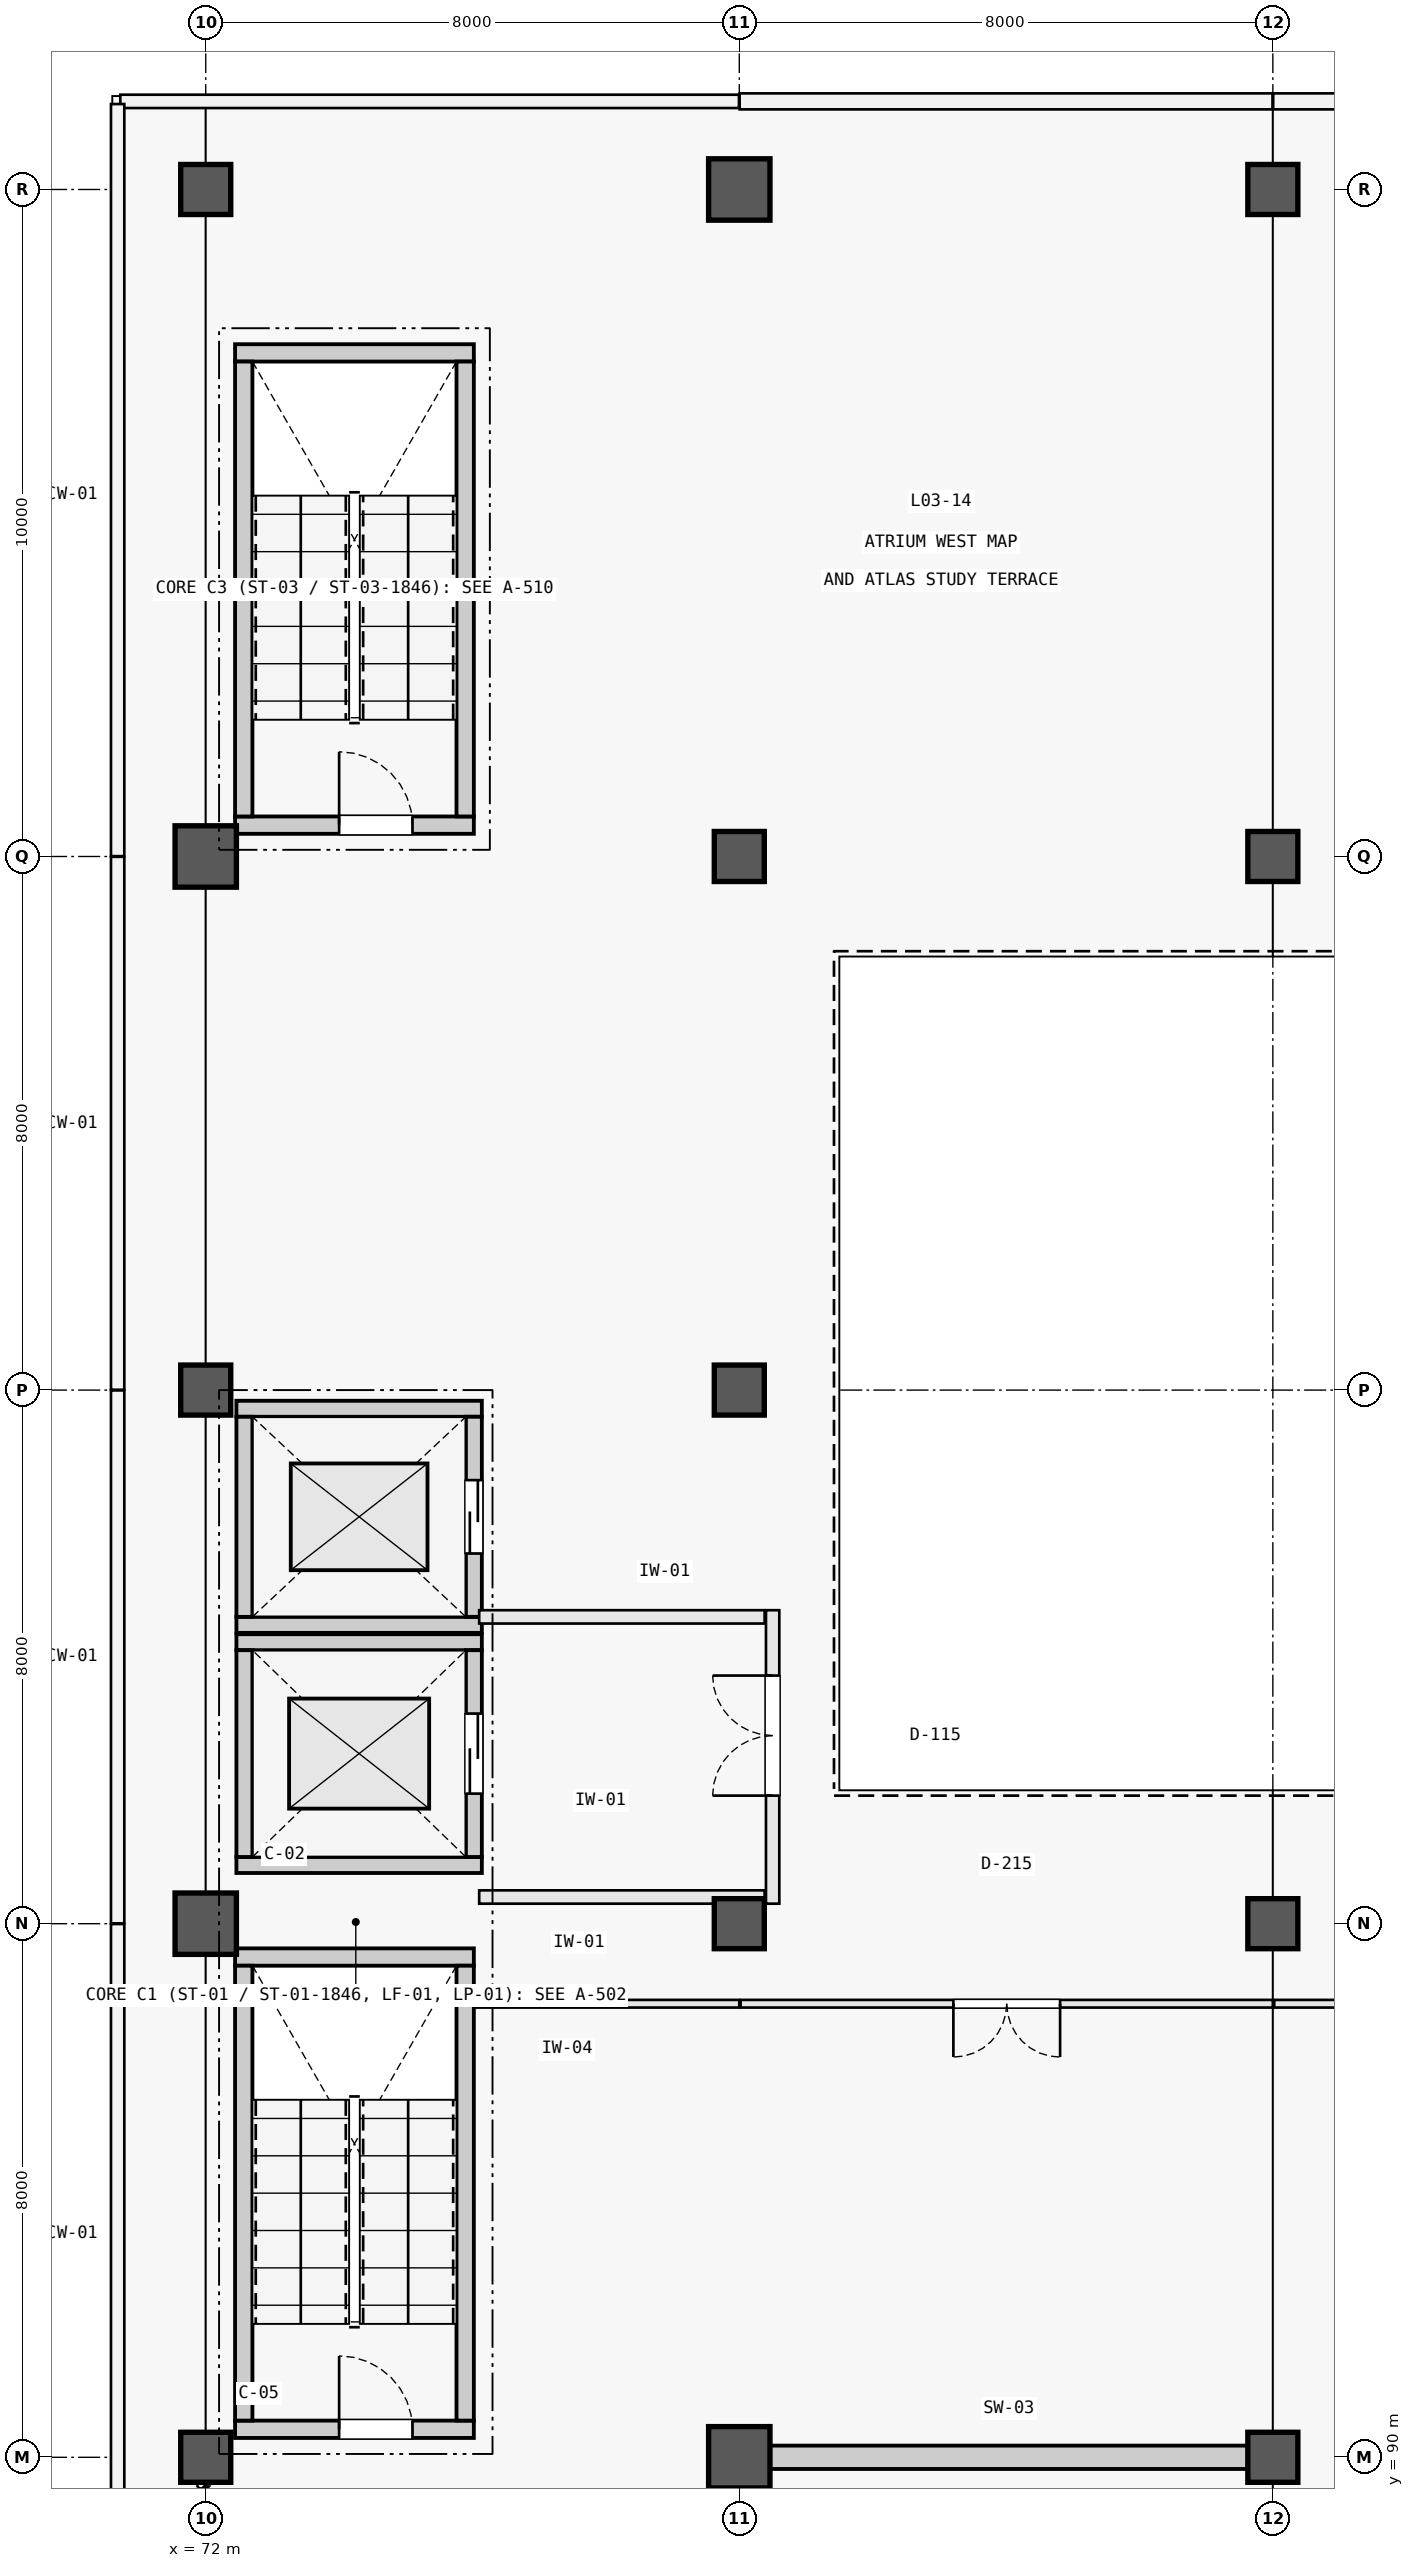
"""IFC4 building model, lengths in metres.
Left out: names, types, materials, properties, quantities, classifications, styles, units other than length and angle.
Written with IfcOpenShell. Run it as: python <this file> out.ifc"""

import sys

from ifc_helpers import new_model, si_unit, direction, frame, frame_2d, origin, origin_2d, place, context, subcontext, project, spatial, rectangle, extrude, element, fill, save


model = new_model("IFC4")
c1 = context("Model", 3, precision=1e-05, world=origin(), true_north=direction((0.0, 1.0)))
c2 = subcontext(c1, "Body", "Model", "MODEL_VIEW")
j1 = project(units=[si_unit("LENGTHUNIT", "METRE"), si_unit("PLANEANGLEUNIT", "RADIAN")], contexts=[c1])
p1 = place(None, origin())
s1 = spatial("IfcSite", under=j1, at=p1, CompositionType="ELEMENT")
p2 = place(p1, origin())
s2 = spatial("IfcBuilding", under=s1, at=p2, CompositionType="ELEMENT")
p3 = place(p2, frame((0.0, 0.0, 10.5)))
s3 = spatial("IfcBuildingStorey", under=s2, at=p3, CompositionType="ELEMENT", Elevation=10.5)
p4 = place(p3, frame((72.0, 90.0, 0.0), z_axis=(0.0, 0.0, 1.0), x_axis=(1.0, 0.0, 0.0)))
e1 = element("IfcColumn", 1, at=p4, inside=s3, PredefinedType="COLUMN", context=c2, shape_type="SweptSolid", body=[
    extrude(rectangle(XDim=0.75, YDim=0.75, at=origin_2d()), origin(), (0.0, 0.0, 1.0), 4.8),
])
p5 = place(p3, frame((72.0, 98.0, 0.0), z_axis=(0.0, 0.0, 1.0), x_axis=(1.0, 0.0, 0.0)))
e2 = element("IfcColumn", 2, at=p5, inside=s3, PredefinedType="COLUMN", context=c2, shape_type="SweptSolid", body=[
    extrude(rectangle(XDim=0.92, YDim=0.92, at=origin_2d()), origin(), (0.0, 0.0, 1.0), 4.8),
])
p6 = place(p3, frame((72.0, 106.0, 0.0), z_axis=(0.0, 0.0, 1.0), x_axis=(1.0, 0.0, 0.0)))
e3 = element("IfcColumn", 3, at=p6, inside=s3, PredefinedType="COLUMN", context=c2, shape_type="SweptSolid", body=[
    extrude(rectangle(XDim=0.75, YDim=0.75, at=origin_2d()), origin(), (0.0, 0.0, 1.0), 4.8),
])
p7 = place(p3, frame((72.0, 114.0, 0.0), z_axis=(0.0, 0.0, 1.0), x_axis=(1.0, 0.0, 0.0)))
e4 = element("IfcColumn", 4, at=p7, inside=s3, PredefinedType="COLUMN", context=c2, shape_type="SweptSolid", body=[
    extrude(rectangle(XDim=0.92, YDim=0.92, at=origin_2d()), origin(), (0.0, 0.0, 1.0), 4.8),
])
p8 = place(p3, frame((72.0, 124.0, 0.0), z_axis=(0.0, 0.0, 1.0), x_axis=(1.0, 0.0, 0.0)))
e5 = element("IfcColumn", 5, at=p8, inside=s3, PredefinedType="COLUMN", context=c2, shape_type="SweptSolid", body=[
    extrude(rectangle(XDim=0.75, YDim=0.75, at=origin_2d()), origin(), (0.0, 0.0, 1.0), 4.8),
])
p9 = place(p3, frame((80.0, 90.0, 0.0), z_axis=(0.0, 0.0, 1.0), x_axis=(1.0, 0.0, 0.0)))
e6 = element("IfcColumn", 6, at=p9, inside=s3, PredefinedType="COLUMN", context=c2, shape_type="SweptSolid", body=[
    extrude(rectangle(XDim=0.92, YDim=0.92, at=origin_2d()), origin(), (0.0, 0.0, 1.0), 4.8),
])
for number, where, z_axis, x_axis in (
    (7, (80.0, 98.0, 0.0), (0.0, 0.0, 1.0), (1.0, 0.0, 0.0)),
    (8, (80.0, 106.0, 0.0), (0.0, 0.0, 1.0), (1.0, 0.0, 0.0)),
    (9, (80.0, 114.0, 0.0), (0.0, 0.0, 1.0), (1.0, 0.0, 0.0)),
):
    element("IfcColumn", number, at=place(p3, frame(where, z_axis=z_axis, x_axis=x_axis)), inside=s3, PredefinedType="COLUMN", context=c2, shape_type="SweptSolid", body=[
        extrude(rectangle(XDim=0.75, YDim=0.75, at=origin_2d()), origin(), (0.0, 0.0, 1.0), 4.8),
    ])
p10 = place(p3, frame((80.0, 124.0, 0.0), z_axis=(0.0, 0.0, 1.0), x_axis=(1.0, 0.0, 0.0)))
e10 = element("IfcColumn", 10, at=p10, inside=s3, PredefinedType="COLUMN", context=c2, shape_type="SweptSolid", body=[
    extrude(rectangle(XDim=0.92, YDim=0.92, at=origin_2d()), origin(), (0.0, 0.0, 1.0), 4.8),
])
for number, where, z_axis, x_axis in (
    (11, (88.0, 90.0, 0.0), (0.0, 0.0, 1.0), (1.0, 0.0, 0.0)),
    (12, (88.0, 98.0, 0.0), (0.0, 0.0, 1.0), (1.0, 0.0, 0.0)),
    (13, (88.0, 114.0, 0.0), (0.0, 0.0, 1.0), (1.0, 0.0, 0.0)),
    (14, (88.0, 124.0, 0.0), (0.0, 0.0, 1.0), (1.0, 0.0, 0.0)),
):
    element("IfcColumn", number, at=place(p3, frame(where, z_axis=z_axis, x_axis=x_axis)), inside=s3, PredefinedType="COLUMN", context=c2, shape_type="SweptSolid", body=[
        extrude(rectangle(XDim=0.75, YDim=0.75, at=origin_2d()), origin(), (0.0, 0.0, 1.0), 4.8),
    ])
p11 = place(p3, frame((80.46, 90.0, 0.0), z_axis=(0.0, 0.0, 1.0), x_axis=(1.0, 0.0, 0.0)))
e15 = element("IfcWall", 15, at=p11, inside=s3, PredefinedType="SHEAR", context=c2, shape_type="SweptSolid", body=[
    extrude(rectangle(XDim=7.165, YDim=0.35, at=frame_2d((3.583, 0.0))), origin(), (0.0, 0.0, 1.0), 4.48),
])
p12 = place(p3, frame((72.44, 90.42, 0.0), z_axis=(0.0, 0.0, 1.0), x_axis=(1.0, 0.0, 0.0)))
e16 = element("IfcWall", 16, at=p12, inside=s3, PredefinedType="SOLIDWALL", context=c2, shape_type="SweptSolid", body=[
    extrude(rectangle(XDim=3.58, YDim=0.26, at=frame_2d((1.79, 0.0))), origin(), (0.0, 0.0, 1.0), 4.8),
])
p13 = place(p12, frame((1.56, 0.0, 0.0)))
e17 = element("IfcOpeningElement", 17, at=p13, cuts=e16, PredefinedType="OPENING", context=c2, shape_type="SweptSolid", body=[
    extrude(rectangle(XDim=1.1, YDim=2.2, at=frame_2d((0.55, 1.1))), frame((0.0, 0.142, 0.0), z_axis=(0.0, -1.0, 0.0), x_axis=(1.0, 0.0, 0.0)), (0.0, 0.0, 1.0), 0.284),
])
p14 = place(p3, frame((72.44, 97.5, 0.0), z_axis=(0.0, 0.0, 1.0), x_axis=(1.0, 0.0, 0.0)))
e18 = element("IfcWall", 18, at=p14, inside=s3, PredefinedType="SOLIDWALL", context=c2, shape_type="SweptSolid", body=[
    extrude(rectangle(XDim=3.58, YDim=0.26, at=frame_2d((1.79, 0.0))), origin(), (0.0, 0.0, 1.0), 4.8),
])
for number, where, z_axis, x_axis in (
    (19, (72.57, 90.55, 0.0), (0.0, 0.0, 1.0), (0.0, 1.0, 0.0)),
    (20, (75.89, 90.55, 0.0), (0.0, 0.0, 1.0), (0.0, 1.0, 0.0)),
):
    element("IfcWall", number, at=place(p3, frame(where, z_axis=z_axis, x_axis=x_axis)), inside=s3, PredefinedType="SOLIDWALL", context=c2, shape_type="SweptSolid", body=[
        extrude(rectangle(XDim=6.82, YDim=0.26, at=frame_2d((3.41, 0.0))), origin(), (0.0, 0.0, 1.0), 4.8),
    ])
p15 = place(p3, frame((72.44, 114.47, 0.0), z_axis=(0.0, 0.0, 1.0), x_axis=(1.0, 0.0, 0.0)))
e21 = element("IfcWall", 21, at=p15, inside=s3, PredefinedType="SOLIDWALL", context=c2, shape_type="SweptSolid", body=[
    extrude(rectangle(XDim=3.58, YDim=0.26, at=frame_2d((1.79, 0.0))), origin(), (0.0, 0.0, 1.0), 4.8),
])
p16 = place(p15, frame((1.56, 0.0, 0.0)))
e22 = element("IfcOpeningElement", 22, at=p16, cuts=e21, PredefinedType="OPENING", context=c2, shape_type="SweptSolid", body=[
    extrude(rectangle(XDim=1.1, YDim=2.2, at=frame_2d((0.55, 1.1))), frame((0.0, 0.142, 0.0), z_axis=(0.0, -1.0, 0.0), x_axis=(1.0, 0.0, 0.0)), (0.0, 0.0, 1.0), 0.284),
])
p17 = place(p3, frame((72.44, 121.55, 0.0), z_axis=(0.0, 0.0, 1.0), x_axis=(1.0, 0.0, 0.0)))
e23 = element("IfcWall", 23, at=p17, inside=s3, PredefinedType="SOLIDWALL", context=c2, shape_type="SweptSolid", body=[
    extrude(rectangle(XDim=3.58, YDim=0.26, at=frame_2d((1.79, 0.0))), origin(), (0.0, 0.0, 1.0), 4.8),
])
for number, where, z_axis, x_axis in (
    (24, (72.57, 114.6, 0.0), (0.0, 0.0, 1.0), (0.0, 1.0, 0.0)),
    (25, (75.89, 114.6, 0.0), (0.0, 0.0, 1.0), (0.0, 1.0, 0.0)),
):
    element("IfcWall", number, at=place(p3, frame(where, z_axis=z_axis, x_axis=x_axis)), inside=s3, PredefinedType="SOLIDWALL", context=c2, shape_type="SweptSolid", body=[
        extrude(rectangle(XDim=6.82, YDim=0.26, at=frame_2d((3.41, 0.0))), origin(), (0.0, 0.0, 1.0), 4.8),
    ])
for number, where, z_axis, x_axis in (
    (26, (72.46, 98.88, 0.0), (0.0, 0.0, 1.0), (1.0, 0.0, 0.0)),
    (27, (72.46, 102.22, 0.0), (0.0, 0.0, 1.0), (1.0, 0.0, 0.0)),
):
    element("IfcWall", number, at=place(p3, frame(where, z_axis=z_axis, x_axis=x_axis)), inside=s3, PredefinedType="SOLIDWALL", context=c2, shape_type="SweptSolid", body=[
        extrude(rectangle(XDim=3.68, YDim=0.24, at=frame_2d((1.84, 0.0))), origin(), (0.0, 0.0, 1.0), 4.8),
    ])
p18 = place(p3, frame((72.58, 99.0, 0.0), z_axis=(0.0, 0.0, 1.0), x_axis=(0.0, 1.0, 0.0)))
e28 = element("IfcWall", 28, at=p18, inside=s3, PredefinedType="SOLIDWALL", context=c2, shape_type="SweptSolid", body=[
    extrude(rectangle(XDim=3.1, YDim=0.24, at=frame_2d((1.55, 0.0))), origin(), (0.0, 0.0, 1.0), 4.8),
])
p19 = place(p3, frame((76.02, 99.0, 0.0), z_axis=(0.0, 0.0, 1.0), x_axis=(0.0, 1.0, 0.0)))
e29 = element("IfcWall", 29, at=p19, inside=s3, PredefinedType="SOLIDWALL", context=c2, shape_type="SweptSolid", body=[
    extrude(rectangle(XDim=3.1, YDim=0.24, at=frame_2d((1.55, 0.0))), origin(), (0.0, 0.0, 1.0), 4.8),
])
p20 = place(p19, frame((0.95, 0.0, 0.0)))
e30 = element("IfcOpeningElement", 30, at=p20, cuts=e29, PredefinedType="OPENING", context=c2, shape_type="SweptSolid", body=[
    extrude(rectangle(XDim=1.2, YDim=2.2, at=frame_2d((0.6, 1.1))), frame((0.0, 0.132, 0.0), z_axis=(0.0, -1.0, 0.0), x_axis=(1.0, 0.0, 0.0)), (0.0, 0.0, 1.0), 0.264),
])
for number, where, z_axis, x_axis in (
    (31, (72.46, 102.48, 0.0), (0.0, 0.0, 1.0), (1.0, 0.0, 0.0)),
    (32, (72.46, 105.72, 0.0), (0.0, 0.0, 1.0), (1.0, 0.0, 0.0)),
):
    element("IfcWall", number, at=place(p3, frame(where, z_axis=z_axis, x_axis=x_axis)), inside=s3, PredefinedType="SOLIDWALL", context=c2, shape_type="SweptSolid", body=[
        extrude(rectangle(XDim=3.68, YDim=0.24, at=frame_2d((1.84, 0.0))), origin(), (0.0, 0.0, 1.0), 4.8),
    ])
p21 = place(p3, frame((72.58, 102.6, 0.0), z_axis=(0.0, 0.0, 1.0), x_axis=(0.0, 1.0, 0.0)))
e33 = element("IfcWall", 33, at=p21, inside=s3, PredefinedType="SOLIDWALL", context=c2, shape_type="SweptSolid", body=[
    extrude(rectangle(XDim=3.0, YDim=0.24, at=frame_2d((1.5, 0.0))), origin(), (0.0, 0.0, 1.0), 4.8),
])
p22 = place(p3, frame((76.02, 102.6, 0.0), z_axis=(0.0, 0.0, 1.0), x_axis=(0.0, 1.0, 0.0)))
e34 = element("IfcWall", 34, at=p22, inside=s3, PredefinedType="SOLIDWALL", context=c2, shape_type="SweptSolid", body=[
    extrude(rectangle(XDim=3.0, YDim=0.24, at=frame_2d((1.5, 0.0))), origin(), (0.0, 0.0, 1.0), 4.8),
])
p23 = place(p22, frame((0.95, 0.0, 0.0)))
e35 = element("IfcOpeningElement", 35, at=p23, cuts=e34, PredefinedType="OPENING", context=c2, shape_type="SweptSolid", body=[
    extrude(rectangle(XDim=1.1, YDim=2.2, at=frame_2d((0.55, 1.1))), frame((0.0, 0.132, 0.0), z_axis=(0.0, -1.0, 0.0), x_axis=(1.0, 0.0, 0.0)), (0.0, 0.0, 1.0), 0.264),
])
for number, where, z_axis, x_axis in (
    (36, (76.1, 98.4, 0.0), (0.0, 0.0, 1.0), (1.0, 0.0, 0.0)),
    (37, (76.1, 102.6, 0.0), (0.0, 0.0, 1.0), (1.0, 0.0, 0.0)),
):
    element("IfcWall", number, at=place(p3, frame(where, z_axis=z_axis, x_axis=x_axis)), inside=s3, PredefinedType="PARTITIONING", context=c2, shape_type="SweptSolid", body=[
        extrude(rectangle(XDim=4.28, YDim=0.2, at=frame_2d((2.14, 0.0))), origin(), (0.0, 0.0, 1.0), 3.5),
    ])
p24 = place(p3, frame((80.5, 98.3, 0.0), z_axis=(0.0, 0.0, 1.0), x_axis=(0.0, 1.0, 0.0)))
e38 = element("IfcWall", 38, at=p24, inside=s3, PredefinedType="PARTITIONING", context=c2, shape_type="SweptSolid", body=[
    extrude(rectangle(XDim=4.4, YDim=0.2, at=frame_2d((2.2, 0.0))), origin(), (0.0, 0.0, 1.0), 3.5),
])
p25 = place(p24, frame((1.62, 0.0, 0.0)))
e39 = element("IfcOpeningElement", 39, at=p25, cuts=e38, PredefinedType="OPENING", context=c2, shape_type="SweptSolid", body=[
    extrude(rectangle(XDim=1.8, YDim=2.25, at=frame_2d((0.9, 1.125))), frame((0.0, 0.112, 0.0), z_axis=(0.0, -1.0, 0.0), x_axis=(1.0, 0.0, 0.0)), (0.0, 0.0, 1.0), 0.224),
])
p26 = place(p3, frame((76.03, 96.8, 0.0), z_axis=(0.0, 0.0, 1.0), x_axis=(1.0, 0.0, 0.0)))
e40 = element("IfcWall", 40, at=p26, inside=s3, PredefinedType="PARTITIONING", context=c2, shape_type="SweptSolid", body=[
    extrude(rectangle(XDim=3.97, YDim=0.115, at=frame_2d((1.985, 0.0))), origin(), (0.0, 0.0, 1.0), 3.33),
])
p27 = place(p3, frame((80.02, 96.8, 0.0), z_axis=(0.0, 0.0, 1.0), x_axis=(1.0, 0.0, 0.0)))
e41 = element("IfcWall", 41, at=p27, inside=s3, PredefinedType="PARTITIONING", context=c2, shape_type="SweptSolid", body=[
    extrude(rectangle(XDim=7.98, YDim=0.115, at=frame_2d((3.99, 0.0))), origin(), (0.0, 0.0, 1.0), 3.33),
])
p28 = place(p27, frame((3.19, 0.0, 0.0)))
e42 = element("IfcOpeningElement", 42, at=p28, cuts=e41, PredefinedType="OPENING", context=c2, shape_type="SweptSolid", body=[
    extrude(rectangle(XDim=1.6, YDim=2.2, at=frame_2d((0.8, 1.1))), frame((0.0, 0.069, 0.0), z_axis=(0.0, -1.0, 0.0), x_axis=(1.0, 0.0, 0.0)), (0.0, 0.0, 1.0), 0.139),
])
p29 = place(p3, frame((88.02, 96.8, 0.0), z_axis=(0.0, 0.0, 1.0), x_axis=(1.0, 0.0, 0.0)))
e43 = element("IfcWall", 43, at=p29, inside=s3, PredefinedType="PARTITIONING", context=c2, shape_type="SweptSolid", body=[
    extrude(rectangle(XDim=7.98, YDim=0.115, at=frame_2d((3.99, 0.0))), origin(), (0.0, 0.0, 1.0), 3.33),
])
p30 = place(p29, frame((3.515, 0.0, 0.0)))
e44 = element("IfcOpeningElement", 44, at=p30, cuts=e43, PredefinedType="OPENING", context=c2, shape_type="SweptSolid", body=[
    extrude(rectangle(XDim=0.95, YDim=2.15, at=frame_2d((0.475, 1.075))), frame((0.0, 0.069, 0.0), z_axis=(0.0, -1.0, 0.0), x_axis=(1.0, 0.0, 0.0)), (0.0, 0.0, 1.0), 0.139),
])
p31 = place(p13, origin())
e45 = element("IfcDoor", 45, at=p31, inside=s3, OperationType="SINGLE_SWING_LEFT", PredefinedType="DOOR", context=c2, shape_type="SweptSolid", body=[
    extrude(rectangle(XDim=1.1, YDim=2.2, at=frame_2d((0.55, 1.1))), frame((0.0, 0.025, 0.0), z_axis=(0.0, -1.0, 0.0), x_axis=(1.0, 0.0, 0.0)), (0.0, 0.0, 1.0), 0.05),
])
fill(e17, e45)
p32 = place(p16, origin())
e46 = element("IfcDoor", 46, at=p32, inside=s3, OperationType="SINGLE_SWING_LEFT", PredefinedType="DOOR", context=c2, shape_type="SweptSolid", body=[
    extrude(rectangle(XDim=1.1, YDim=2.2, at=frame_2d((0.55, 1.1))), frame((0.0, 0.025, 0.0), z_axis=(0.0, -1.0, 0.0), x_axis=(1.0, 0.0, 0.0)), (0.0, 0.0, 1.0), 0.05),
])
fill(e22, e46)
p33 = place(p20, origin())
e47 = element("IfcDoor", 47, at=p33, inside=s3, OperationType="DOUBLE_DOOR_SLIDING", PredefinedType="DOOR", context=c2, shape_type="SweptSolid", body=[
    extrude(rectangle(XDim=1.2, YDim=2.2, at=frame_2d((0.6, 1.1))), frame((0.0, 0.025, 0.0), z_axis=(0.0, -1.0, 0.0), x_axis=(1.0, 0.0, 0.0)), (0.0, 0.0, 1.0), 0.05),
])
fill(e30, e47)
p34 = place(p23, origin())
e48 = element("IfcDoor", 48, at=p34, inside=s3, OperationType="DOUBLE_DOOR_SLIDING", PredefinedType="DOOR", context=c2, shape_type="SweptSolid", body=[
    extrude(rectangle(XDim=1.1, YDim=2.2, at=frame_2d((0.55, 1.1))), frame((0.0, 0.025, 0.0), z_axis=(0.0, -1.0, 0.0), x_axis=(1.0, 0.0, 0.0)), (0.0, 0.0, 1.0), 0.05),
])
fill(e35, e48)
p35 = place(p25, origin())
e49 = element("IfcDoor", 49, at=p35, inside=s3, OperationType="DOUBLE_DOOR_SINGLE_SWING", PredefinedType="DOOR", context=c2, shape_type="SweptSolid", body=[
    extrude(rectangle(XDim=1.8, YDim=2.25, at=frame_2d((0.9, 1.125))), frame((0.0, 0.025, 0.0), z_axis=(0.0, -1.0, 0.0), x_axis=(1.0, 0.0, 0.0)), (0.0, 0.0, 1.0), 0.05),
])
fill(e39, e49)
p36 = place(p28, frame((1.6, 0.0, 0.0), z_axis=(0.0, 0.0, 1.0), x_axis=(-1.0, 0.0, 0.0)))
e50 = element("IfcDoor", 50, at=p36, inside=s3, OperationType="DOUBLE_DOOR_SINGLE_SWING", PredefinedType="DOOR", context=c2, shape_type="SweptSolid", body=[
    extrude(rectangle(XDim=1.6, YDim=2.2, at=frame_2d((0.8, 1.1))), frame((0.0, 0.025, 0.0), z_axis=(0.0, -1.0, 0.0), x_axis=(1.0, 0.0, 0.0)), (0.0, 0.0, 1.0), 0.05),
])
fill(e42, e50)
save(model, sys.argv[1])
